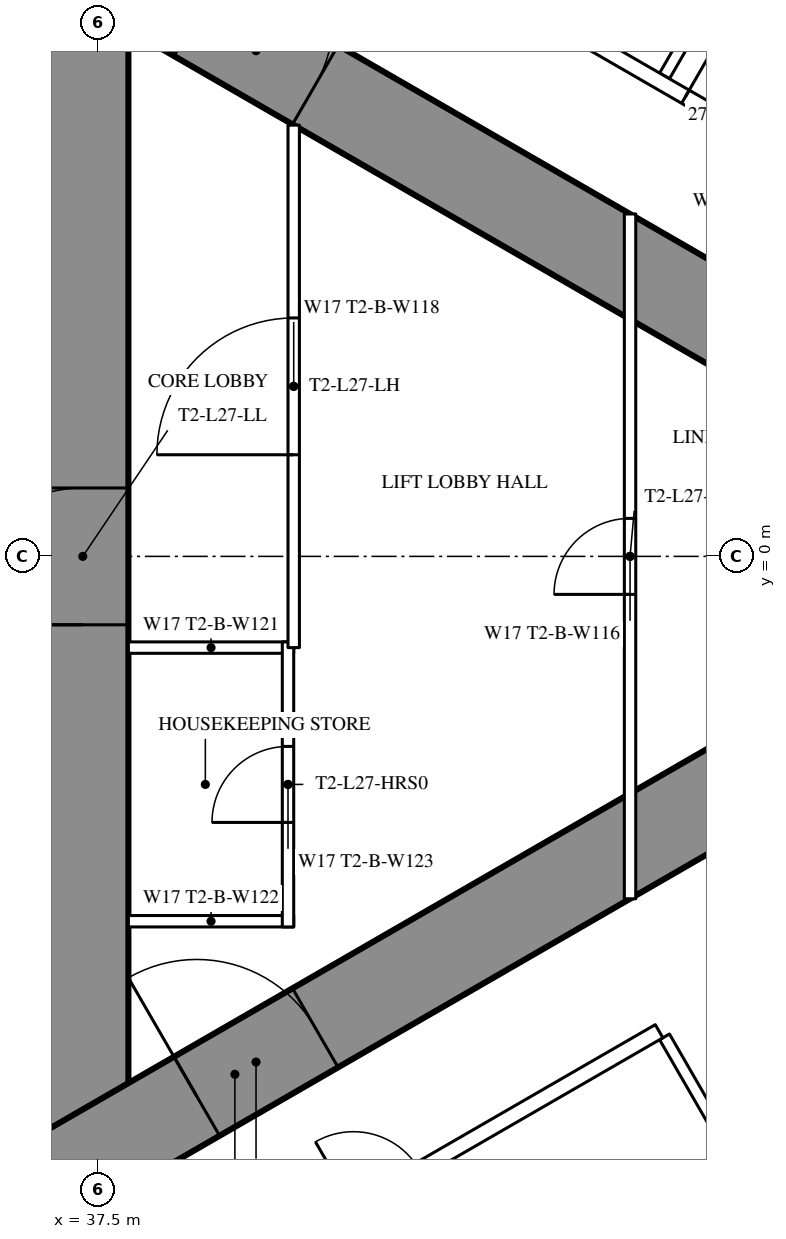
"""IFC4 building model, lengths in metres.
Left out: names, types, materials, properties, quantities, classifications, styles, units other than length and angle.
Written with IfcOpenShell. Run it as: python <this file> out.ifc"""

import sys

from ifc_helpers import new_model, si_unit, direction, frame, frame_2d, origin, place, context, subcontext, project, spatial, rectangle, extrude, element, fill, save


model = new_model("IFC4")
c1 = context("Model", 3, precision=1e-05, world=origin(), true_north=direction((0.0, 1.0)))
c2 = subcontext(c1, "Body", "Model", "MODEL_VIEW")
j1 = project(units=[si_unit("LENGTHUNIT", "METRE"), si_unit("PLANEANGLEUNIT", "RADIAN")], contexts=[c1])
p1 = place(None, origin())
s1 = spatial("IfcSite", under=j1, at=p1, CompositionType="ELEMENT")
p2 = place(p1, origin())
s2 = spatial("IfcBuilding", under=s1, at=p2, CompositionType="ELEMENT")
p3 = place(p2, frame((0.0, 0.0, 104.6)))
s3 = spatial("IfcBuildingStorey", under=s2, at=p3, CompositionType="ELEMENT", Elevation=104.6)
p4 = place(p3, frame((37.3, -8.6, 0.0), z_axis=(0.0, 0.0, 1.0), x_axis=(0.0, 1.0, 0.0)))
e1 = element("IfcWall", 1, at=p4, inside=s3, PredefinedType="SHEAR", context=c2, shape_type="SweptSolid", body=[
    extrude(rectangle(XDim=17.2, YDim=1.2, at=frame_2d((8.6, 0.0))), origin(), (0.0, 0.0, 1.0), 3.5),
])
p5 = place(p4, frame((7.7, 0.0, 0.0)))
e2 = element("IfcOpeningElement", 2, at=p5, cuts=e1, PredefinedType="OPENING", context=c2, shape_type="SweptSolid", body=[
    extrude(rectangle(XDim=1.8, YDim=2.2, at=frame_2d((0.9, 1.1))), frame((0.0, 0.61, 0.0), z_axis=(0.0, -1.0, 0.0), x_axis=(1.0, 0.0, 0.0)), (0.0, 0.0, 1.0), 1.22),
])
p6 = place(p3, frame((27.2, -13.8, 0.0), z_axis=(0.0, 0.0, 1.0), x_axis=(0.866027159892, 0.499996958321, 0.0)))
e3 = element("IfcWall", 3, at=p6, inside=s3, PredefinedType="SHEAR", context=c2, shape_type="SweptSolid", body=[
    extrude(rectangle(XDim=27.947, YDim=1.2, at=frame_2d((13.973, 0.0))), origin(), (0.0, 0.0, 1.0), 3.5),
])
p7 = place(p6, frame((4.6, 0.0, 0.0)))
e4 = element("IfcOpeningElement", 4, at=p7, cuts=e3, PredefinedType="OPENING", context=c2, shape_type="SweptSolid", body=[
    extrude(rectangle(XDim=1.0, YDim=2.2, at=frame_2d((0.5, 1.1))), frame((0.0, 0.61, 0.0), z_axis=(0.0, -1.0, 0.0), x_axis=(1.0, 0.0, 0.0)), (0.0, 0.0, 1.0), 1.22),
])
p8 = place(p6, frame((13.395, 0.0, 0.0)))
e5 = element("IfcOpeningElement", 5, at=p8, cuts=e3, PredefinedType="OPENING", context=c2, shape_type="SweptSolid", body=[
    extrude(rectangle(XDim=1.8, YDim=2.2, at=frame_2d((0.9, 1.1))), frame((0.0, 0.61, 0.0), z_axis=(0.0, -1.0, 0.0), x_axis=(1.0, 0.0, 0.0)), (0.0, 0.0, 1.0), 1.22),
])
p9 = place(p3, frame((27.2, 13.8, 0.0), z_axis=(0.0, 0.0, 1.0), x_axis=(0.866024515034, -0.500001539357, 0.0)))
e6 = element("IfcWall", 6, at=p9, inside=s3, PredefinedType="SHEAR", context=c2, shape_type="SweptSolid", body=[
    extrude(rectangle(XDim=26.907, YDim=1.2, at=frame_2d((13.454, 0.0))), origin(), (0.0, 0.0, 1.0), 3.5),
])
p10 = place(p9, frame((4.6, 0.0, 0.0)))
e7 = element("IfcOpeningElement", 7, at=p10, cuts=e6, PredefinedType="OPENING", context=c2, shape_type="SweptSolid", body=[
    extrude(rectangle(XDim=1.0, YDim=2.2, at=frame_2d((0.5, 1.1))), frame((0.0, 0.61, 0.0), z_axis=(0.0, -1.0, 0.0), x_axis=(1.0, 0.0, 0.0)), (0.0, 0.0, 1.0), 1.22),
])
p11 = place(p9, frame((13.395, 0.0, 0.0)))
e8 = element("IfcOpeningElement", 8, at=p11, cuts=e6, PredefinedType="OPENING", context=c2, shape_type="SweptSolid", body=[
    extrude(rectangle(XDim=1.8, YDim=2.2, at=frame_2d((0.9, 1.1))), frame((0.0, 0.61, 0.0), z_axis=(0.0, -1.0, 0.0), x_axis=(1.0, 0.0, 0.0)), (0.0, 0.0, 1.0), 1.22),
])
p12 = place(p3, frame((44.954, -6.321, 0.0), z_axis=(0.0, 0.0, 1.0), x_axis=(0.500018676722, -0.866014620505, 0.0)))
e9 = element("IfcWall", 9, at=p12, inside=s3, PredefinedType="PARTITIONING", context=c2, shape_type="SweptSolid", body=[
    extrude(rectangle(XDim=8.704, YDim=0.15, at=frame_2d((4.352, 0.0))), origin(), (0.0, 0.0, 1.0), 2.2),
])
p13 = place(p3, frame((44.954, 6.321, 0.0), z_axis=(0.0, 0.0, 1.0), x_axis=(0.500009815811, 0.866019736549, 0.0)))
e10 = element("IfcWall", 10, at=p13, inside=s3, PredefinedType="PARTITIONING", context=c2, shape_type="SweptSolid", body=[
    extrude(rectangle(XDim=11.424, YDim=0.15, at=frame_2d((5.712, 0.0))), origin(), (0.0, 0.0, 1.0), 3.25),
])
p14 = place(p3, frame((36.834, 10.894, 0.0), z_axis=(0.0, 0.0, 1.0), x_axis=(0.866028157229, -0.499995230863, 0.0)))
e11 = element("IfcWall", 11, at=p14, inside=s3, PredefinedType="PARTITIONING", context=c2, shape_type="SweptSolid", body=[
    extrude(rectangle(XDim=21.667, YDim=0.2, at=frame_2d((10.833, 0.0))), origin(), (0.0, 0.0, 1.0), 3.25),
])
p15 = place(p14, frame((20.117, 0.0, 0.0)))
e12 = element("IfcOpeningElement", 12, at=p15, cuts=e11, PredefinedType="OPENING", context=c2, shape_type="SweptSolid", body=[
    extrude(rectangle(XDim=0.95, YDim=2.2, at=frame_2d((0.475, 1.1))), frame((0.0, 0.11, 0.0), z_axis=(0.0, -1.0, 0.0), x_axis=(1.0, 0.0, 0.0)), (0.0, 0.0, 1.0), 0.22),
])
p16 = place(p14, frame((14.335, 0.0, 0.0)))
e13 = element("IfcOpeningElement", 13, at=p16, cuts=e11, PredefinedType="OPENING", context=c2, shape_type="SweptSolid", body=[
    extrude(rectangle(XDim=0.95, YDim=2.2, at=frame_2d((0.475, 1.1))), frame((0.0, 0.11, 0.0), z_axis=(0.0, -1.0, 0.0), x_axis=(1.0, 0.0, 0.0)), (0.0, 0.0, 1.0), 0.22),
])
p17 = place(p14, frame((9.693, 0.0, 0.0)))
e14 = element("IfcOpeningElement", 14, at=p17, cuts=e11, PredefinedType="OPENING", context=c2, shape_type="SweptSolid", body=[
    extrude(rectangle(XDim=0.95, YDim=2.2, at=frame_2d((0.475, 1.1))), frame((0.0, 0.11, 0.0), z_axis=(0.0, -1.0, 0.0), x_axis=(1.0, 0.0, 0.0)), (0.0, 0.0, 1.0), 0.22),
])
p18 = place(p14, frame((2.95, 0.0, 0.0)))
e15 = element("IfcOpeningElement", 15, at=p18, cuts=e11, PredefinedType="OPENING", context=c2, shape_type="SweptSolid", body=[
    extrude(rectangle(XDim=0.95, YDim=2.2, at=frame_2d((0.475, 1.1))), frame((0.0, 0.11, 0.0), z_axis=(0.0, -1.0, 0.0), x_axis=(1.0, 0.0, 0.0)), (0.0, 0.0, 1.0), 0.22),
])
p19 = place(p3, frame((37.96, -10.243, 0.0), z_axis=(0.0, 0.0, 1.0), x_axis=(0.86603350054, 0.499985975746, 0.0)))
e16 = element("IfcWall", 16, at=p19, inside=s3, PredefinedType="PARTITIONING", context=c2, shape_type="SweptSolid", body=[
    extrude(rectangle(XDim=7.993, YDim=0.2, at=frame_2d((3.997, 0.0))), origin(), (0.0, 0.0, 1.0), 3.25),
])
p20 = place(p19, frame((3.35, 0.0, 0.0)))
e17 = element("IfcOpeningElement", 17, at=p20, cuts=e16, PredefinedType="OPENING", context=c2, shape_type="SweptSolid", body=[
    extrude(rectangle(XDim=1.0, YDim=2.2, at=frame_2d((0.5, 1.1))), frame((0.0, 0.11, 0.0), z_axis=(0.0, -1.0, 0.0), x_axis=(1.0, 0.0, 0.0)), (0.0, 0.0, 1.0), 0.22),
])
for number, where, z_axis, x_axis in (
    (18, (37.9, -1.2, 0.0), (0.0, 0.0, 1.0), (1.0, 0.0, 0.0)),
    (19, (37.9, -4.8, 0.0), (0.0, 0.0, 1.0), (1.0, 0.0, 0.0)),
):
    element("IfcWall", number, at=place(p3, frame(where, z_axis=z_axis, x_axis=x_axis)), inside=s3, PredefinedType="PARTITIONING", context=c2, shape_type="SweptSolid", body=[
        extrude(rectangle(XDim=2.175, YDim=0.15, at=frame_2d((1.087, 0.0))), origin(), (0.0, 0.0, 1.0), 3.25),
    ])
p21 = place(p3, frame((40.0, -4.875, 0.0), z_axis=(0.0, 0.0, 1.0), x_axis=(0.0, 1.0, 0.0)))
e20 = element("IfcWall", 20, at=p21, inside=s3, PredefinedType="PARTITIONING", context=c2, shape_type="SweptSolid", body=[
    extrude(rectangle(XDim=3.75, YDim=0.15, at=frame_2d((1.875, 0.0))), origin(), (0.0, 0.0, 1.0), 3.25),
])
p22 = place(p21, frame((1.375, 0.0, 0.0)))
e21 = element("IfcOpeningElement", 21, at=p22, cuts=e20, PredefinedType="OPENING", context=c2, shape_type="SweptSolid", body=[
    extrude(rectangle(XDim=1.0, YDim=2.2, at=frame_2d((0.5, 1.1))), frame((0.0, 0.085, 0.0), z_axis=(0.0, -1.0, 0.0), x_axis=(1.0, 0.0, 0.0)), (0.0, 0.0, 1.0), 0.17),
])
p23 = place(p3, frame((40.075, -1.2, 0.0), z_axis=(0.0, 0.0, 1.0), x_axis=(0.0, 1.0, 0.0)))
e22 = element("IfcWall", 22, at=p23, inside=s3, PredefinedType="PARTITIONING", context=c2, shape_type="SweptSolid", body=[
    extrude(rectangle(XDim=6.874, YDim=0.15, at=frame_2d((3.437, 0.0))), origin(), (0.0, 0.0, 1.0), 3.25),
])
p24 = place(p23, frame((2.537, 0.0, 0.0)))
e23 = element("IfcOpeningElement", 23, at=p24, cuts=e22, PredefinedType="OPENING", context=c2, shape_type="SweptSolid", body=[
    extrude(rectangle(XDim=1.8, YDim=2.2, at=frame_2d((0.9, 1.1))), frame((0.0, 0.085, 0.0), z_axis=(0.0, -1.0, 0.0), x_axis=(1.0, 0.0, 0.0)), (0.0, 0.0, 1.0), 0.17),
])
p25 = place(p3, frame((44.5, -4.505, 0.0), z_axis=(0.0, 0.0, 1.0), x_axis=(0.0, 1.0, 0.0)))
e24 = element("IfcWall", 24, at=p25, inside=s3, PredefinedType="PARTITIONING", context=c2, shape_type="SweptSolid", body=[
    extrude(rectangle(XDim=9.009, YDim=0.15, at=frame_2d((4.505, 0.0))), origin(), (0.0, 0.0, 1.0), 2.45),
])
p26 = place(p25, frame((4.005, 0.0, 0.0)))
e25 = element("IfcOpeningElement", 25, at=p26, cuts=e24, PredefinedType="OPENING", context=c2, shape_type="SweptSolid", body=[
    extrude(rectangle(XDim=1.0, YDim=2.2, at=frame_2d((0.5, 1.1))), frame((0.0, 0.085, 0.0), z_axis=(0.0, -1.0, 0.0), x_axis=(1.0, 0.0, 0.0)), (0.0, 0.0, 1.0), 0.17),
])
p27 = place(p17, origin())
e26 = element("IfcDoor", 26, at=p27, inside=s3, OperationType="SINGLE_SWING_LEFT", PredefinedType="DOOR", context=c2, shape_type="SweptSolid", body=[
    extrude(rectangle(XDim=0.95, YDim=2.2, at=frame_2d((0.475, 1.1))), frame((0.0, 0.025, 0.0), z_axis=(0.0, -1.0, 0.0), x_axis=(1.0, 0.0, 0.0)), (0.0, 0.0, 1.0), 0.05),
])
fill(e14, e26)
p28 = place(p22, origin())
e27 = element("IfcDoor", 27, at=p28, inside=s3, OperationType="SINGLE_SWING_LEFT", PredefinedType="DOOR", context=c2, shape_type="SweptSolid", body=[
    extrude(rectangle(XDim=1.0, YDim=2.2, at=frame_2d((0.5, 1.1))), frame((0.0, 0.025, 0.0), z_axis=(0.0, -1.0, 0.0), x_axis=(1.0, 0.0, 0.0)), (0.0, 0.0, 1.0), 0.05),
])
fill(e21, e27)
p29 = place(p24, origin())
e28 = element("IfcDoor", 28, at=p29, inside=s3, OperationType="DOUBLE_DOOR_SINGLE_SWING", PredefinedType="DOOR", context=c2, shape_type="SweptSolid", body=[
    extrude(rectangle(XDim=1.8, YDim=2.2, at=frame_2d((0.9, 1.1))), frame((0.0, 0.025, 0.0), z_axis=(0.0, -1.0, 0.0), x_axis=(1.0, 0.0, 0.0)), (0.0, 0.0, 1.0), 0.05),
])
fill(e23, e28)
p30 = place(p26, origin())
e29 = element("IfcDoor", 29, at=p30, inside=s3, OperationType="SINGLE_SWING_LEFT", PredefinedType="DOOR", context=c2, shape_type="SweptSolid", body=[
    extrude(rectangle(XDim=1.0, YDim=2.2, at=frame_2d((0.5, 1.1))), frame((0.0, 0.025, 0.0), z_axis=(0.0, -1.0, 0.0), x_axis=(1.0, 0.0, 0.0)), (0.0, 0.0, 1.0), 0.05),
])
fill(e25, e29)
p31 = place(p8, origin())
e30 = element("IfcDoor", 30, at=p31, inside=s3, OperationType="DOUBLE_DOOR_SINGLE_SWING", PredefinedType="DOOR", context=c2, shape_type="SweptSolid", body=[
    extrude(rectangle(XDim=1.8, YDim=2.2, at=frame_2d((0.9, 1.1))), frame((0.0, 0.025, 0.0), z_axis=(0.0, -1.0, 0.0), x_axis=(1.0, 0.0, 0.0)), (0.0, 0.0, 1.0), 0.05),
])
fill(e5, e30)
p32 = place(p11, origin())
e31 = element("IfcDoor", 31, at=p32, inside=s3, OperationType="DOUBLE_DOOR_SINGLE_SWING", PredefinedType="DOOR", context=c2, shape_type="SweptSolid", body=[
    extrude(rectangle(XDim=1.8, YDim=2.2, at=frame_2d((0.9, 1.1))), frame((0.0, 0.025, 0.0), z_axis=(0.0, -1.0, 0.0), x_axis=(1.0, 0.0, 0.0)), (0.0, 0.0, 1.0), 0.05),
])
fill(e8, e31)
p33 = place(p5, origin())
e32 = element("IfcDoor", 32, at=p33, inside=s3, OperationType="DOUBLE_DOOR_SINGLE_SWING", PredefinedType="DOOR", context=c2, shape_type="SweptSolid", body=[
    extrude(rectangle(XDim=1.8, YDim=2.2, at=frame_2d((0.9, 1.1))), frame((0.0, 0.025, 0.0), z_axis=(0.0, -1.0, 0.0), x_axis=(1.0, 0.0, 0.0)), (0.0, 0.0, 1.0), 0.05),
])
fill(e2, e32)
save(model, sys.argv[1])
